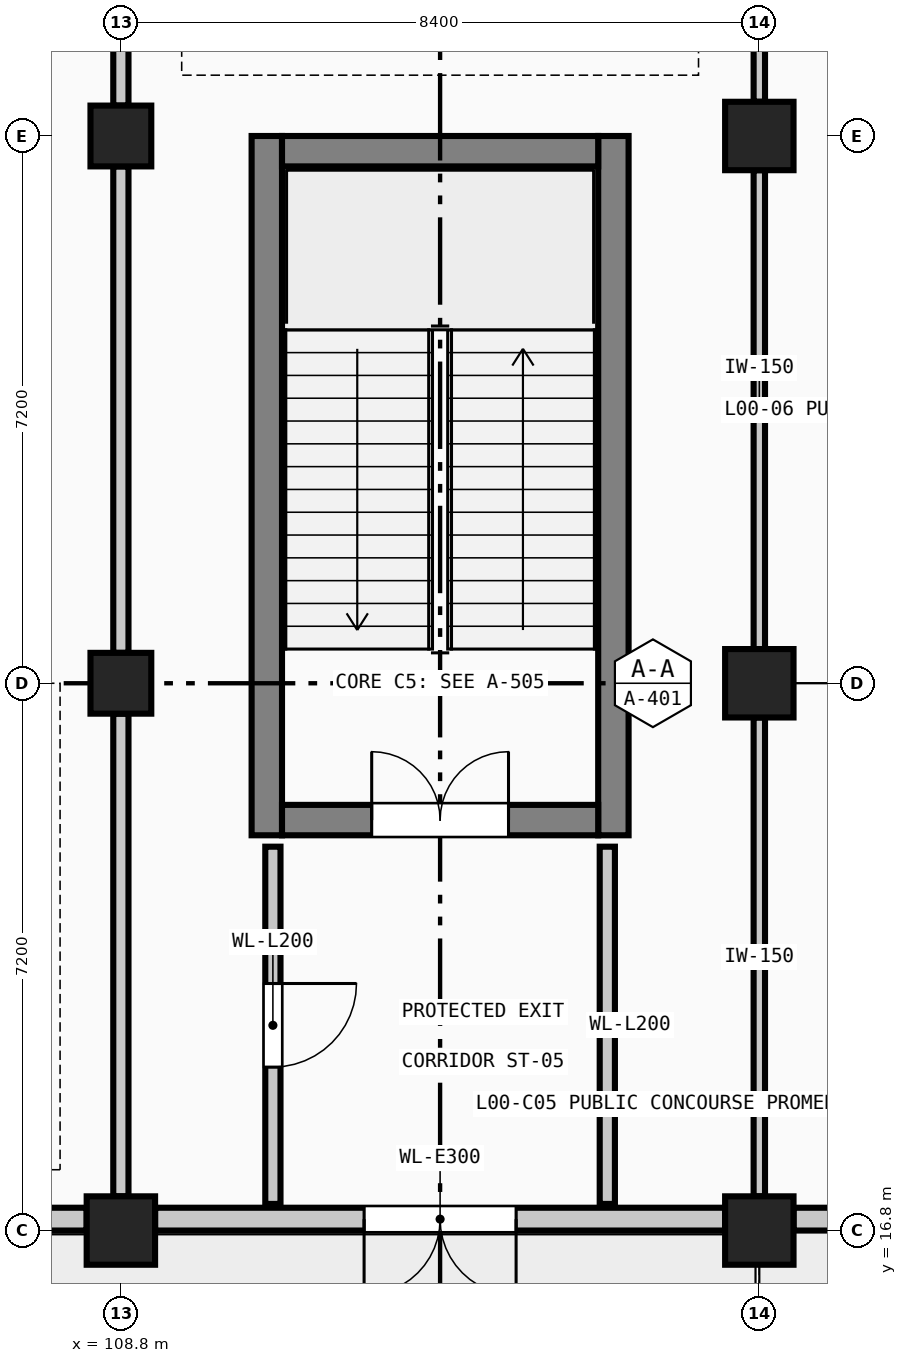
"""IFC4 building model, lengths in metres.
Left out: names, types, materials, properties, quantities, classifications, styles, units other than length and angle.
Written with IfcOpenShell. Run it as: python <this file> out.ifc"""

import sys

from ifc_helpers import new_model, si_unit, direction, frame, frame_2d, origin, origin_2d, place, context, subcontext, project, spatial, rectangle, extrude, element, fill, save


model = new_model("IFC4")
c1 = context("Model", 3, precision=1e-05, world=origin(), true_north=direction((0.0, 1.0)))
c2 = subcontext(c1, "Body", "Model", "MODEL_VIEW")
j1 = project(units=[si_unit("LENGTHUNIT", "METRE"), si_unit("PLANEANGLEUNIT", "RADIAN")], contexts=[c1])
p1 = place(None, origin())
s1 = spatial("IfcSite", under=j1, at=p1, CompositionType="ELEMENT")
p2 = place(p1, origin())
s2 = spatial("IfcBuilding", under=s1, at=p2, CompositionType="ELEMENT")
p3 = place(p2, origin())
s3 = spatial("IfcBuildingStorey", under=s2, at=p3, CompositionType="ELEMENT", Elevation=0.0)
p4 = place(p3, frame((108.8, 16.8, 0.0), z_axis=(0.0, 0.0, 1.0), x_axis=(1.0, 0.0, 0.0)))
e1 = element("IfcColumn", 1, at=p4, inside=s3, PredefinedType="COLUMN", context=c2, shape_type="SweptSolid", body=[
    extrude(rectangle(XDim=0.9, YDim=0.9, at=origin_2d()), origin(), (0.0, 0.0, 1.0), 4.8),
])
for number, where, z_axis, x_axis in (
    (2, (108.8, 24.0, 0.0), (0.0, 0.0, 1.0), (1.0, 0.0, 0.0)),
    (3, (108.8, 31.2, 0.0), (0.0, 0.0, 1.0), (1.0, 0.0, 0.0)),
):
    element("IfcColumn", number, at=place(p3, frame(where, z_axis=z_axis, x_axis=x_axis)), inside=s3, PredefinedType="COLUMN", context=c2, shape_type="SweptSolid", body=[
        extrude(rectangle(XDim=0.8, YDim=0.8, at=origin_2d()), origin(), (0.0, 0.0, 1.0), 4.8),
    ])
for number, where, z_axis, x_axis in (
    (4, (117.2, 16.8, 0.0), (0.0, 0.0, 1.0), (1.0, 0.0, 0.0)),
    (5, (117.2, 24.0, 0.0), (0.0, 0.0, 1.0), (1.0, 0.0, 0.0)),
    (6, (117.2, 31.2, 0.0), (0.0, 0.0, 1.0), (1.0, 0.0, 0.0)),
):
    element("IfcColumn", number, at=place(p3, frame(where, z_axis=z_axis, x_axis=x_axis)), inside=s3, PredefinedType="COLUMN", context=c2, shape_type="SweptSolid", body=[
        extrude(rectangle(XDim=0.9, YDim=0.9, at=origin_2d()), origin(), (0.0, 0.0, 1.0), 4.8),
    ])
for number, where, z_axis, x_axis in (
    (7, (110.72, 22.0, 0.0), (0.0, 0.0, 1.0), (0.0, 1.0, 0.0)),
    (8, (115.28, 31.2, 0.0), (0.0, 0.0, 1.0), (0.0, -1.0, 0.0)),
):
    element("IfcWall", number, at=place(p3, frame(where, z_axis=z_axis, x_axis=x_axis)), inside=s3, PredefinedType="SHEAR", context=c2, shape_type="SweptSolid", body=[
        extrude(rectangle(XDim=9.2, YDim=0.4, at=frame_2d((4.6, 0.0))), origin(), (0.0, 0.0, 1.0), 4.575),
    ])
p5 = place(p3, frame((115.08, 22.2, 0.0), z_axis=(0.0, 0.0, 1.0), x_axis=(-1.0, 0.0, 0.0)))
e9 = element("IfcWall", 9, at=p5, inside=s3, PredefinedType="SHEAR", context=c2, shape_type="SweptSolid", body=[
    extrude(rectangle(XDim=4.16, YDim=0.4, at=frame_2d((2.08, 0.0))), origin(), (0.0, 0.0, 1.0), 4.575),
])
p6 = place(p5, frame((1.18, 0.0, 0.0)))
e10 = element("IfcOpeningElement", 10, at=p6, cuts=e9, PredefinedType="OPENING", context=c2, shape_type="SweptSolid", body=[
    extrude(rectangle(XDim=1.8, YDim=2.2, at=frame_2d((0.9, 1.1))), frame((0.0, 0.21, 0.0), z_axis=(0.0, -1.0, 0.0), x_axis=(1.0, 0.0, 0.0)), (0.0, 0.0, 1.0), 0.42),
])
p7 = place(p3, frame((110.92, 31.0, 0.0), z_axis=(0.0, 0.0, 1.0), x_axis=(1.0, 0.0, 0.0)))
e11 = element("IfcWall", 11, at=p7, inside=s3, PredefinedType="SHEAR", context=c2, shape_type="SweptSolid", body=[
    extrude(rectangle(XDim=4.16, YDim=0.4, at=frame_2d((2.08, 0.0))), origin(), (0.0, 0.0, 1.0), 4.575),
])
p8 = place(p3, frame((110.8, 17.15, 0.0), z_axis=(0.0, 0.0, 1.0), x_axis=(0.0, 1.0, 0.0)))
e12 = element("IfcWall", 12, at=p8, inside=s3, PredefinedType="SOLIDWALL", context=c2, shape_type="SweptSolid", body=[
    extrude(rectangle(XDim=4.7, YDim=0.2, at=frame_2d((2.35, 0.0))), origin(), (0.0, 0.0, 1.0), 4.525),
])
p9 = place(p8, frame((1.8, 0.0, 0.0)))
e13 = element("IfcOpeningElement", 13, at=p9, cuts=e12, PredefinedType="OPENING", context=c2, shape_type="SweptSolid", body=[
    extrude(rectangle(XDim=1.1, YDim=2.2, at=frame_2d((0.55, 1.1))), frame((0.0, 0.11, 0.0), z_axis=(0.0, -1.0, 0.0), x_axis=(1.0, 0.0, 0.0)), (0.0, 0.0, 1.0), 0.22),
])
p10 = place(p3, frame((115.2, 17.15, 0.0), z_axis=(0.0, 0.0, 1.0), x_axis=(0.0, 1.0, 0.0)))
e14 = element("IfcWall", 14, at=p10, inside=s3, PredefinedType="SOLIDWALL", context=c2, shape_type="SweptSolid", body=[
    extrude(rectangle(XDim=4.7, YDim=0.2, at=frame_2d((2.35, 0.0))), origin(), (0.0, 0.0, 1.0), 4.525),
])
p11 = place(p3, frame((125.2, 16.95, 0.0), z_axis=(0.0, 0.0, 1.0), x_axis=(-1.0, 0.0, 0.0)))
e15 = element("IfcWall", 15, at=p11, inside=s3, PredefinedType="SOLIDWALL", context=c2, shape_type="SweptSolid", body=[
    extrude(rectangle(XDim=7.55, YDim=0.3, at=frame_2d((3.775, 0.0))), origin(), (0.0, 0.0, 1.0), 4.1),
])
p12 = place(p11, frame((2.275, 0.0, 0.75)))
e16 = element("IfcOpeningElement", 16, at=p12, cuts=e15, PredefinedType="OPENING", context=c2, shape_type="SweptSolid", body=[
    extrude(rectangle(XDim=3.0, YDim=2.4, at=frame_2d((1.5, 1.2))), frame((0.0, 0.16, 0.0), z_axis=(0.0, -1.0, 0.0), x_axis=(1.0, 0.0, 0.0)), (0.0, 0.0, 1.0), 0.32),
])
p13 = place(p3, frame((116.75, 16.95, 0.0), z_axis=(0.0, 0.0, 1.0), x_axis=(-1.0, 0.0, 0.0)))
e17 = element("IfcWall", 17, at=p13, inside=s3, PredefinedType="SOLIDWALL", context=c2, shape_type="SweptSolid", body=[
    extrude(rectangle(XDim=7.5, YDim=0.3, at=frame_2d((3.75, 0.0))), origin(), (0.0, 0.0, 1.0), 4.0),
])
p14 = place(p13, frame((2.75, 0.0, 0.0)))
e18 = element("IfcOpeningElement", 18, at=p14, cuts=e17, PredefinedType="OPENING", context=c2, shape_type="SweptSolid", body=[
    extrude(rectangle(XDim=2.0, YDim=2.4, at=frame_2d((1.0, 1.2))), frame((0.0, 0.16, 0.0), z_axis=(0.0, -1.0, 0.0), x_axis=(1.0, 0.0, 0.0)), (0.0, 0.0, 1.0), 0.32),
])
p15 = place(p3, frame((108.35, 16.95, 0.0), z_axis=(0.0, 0.0, 1.0), x_axis=(-1.0, 0.0, 0.0)))
e19 = element("IfcWall", 19, at=p15, inside=s3, PredefinedType="SOLIDWALL", context=c2, shape_type="SweptSolid", body=[
    extrude(rectangle(XDim=7.5, YDim=0.3, at=frame_2d((3.75, 0.0))), origin(), (0.0, 0.0, 1.0), 4.0),
])
p16 = place(p15, frame((2.25, 0.0, 0.75)))
e20 = element("IfcOpeningElement", 20, at=p16, cuts=e19, PredefinedType="OPENING", context=c2, shape_type="SweptSolid", body=[
    extrude(rectangle(XDim=3.0, YDim=2.4, at=frame_2d((1.5, 1.2))), frame((0.0, 0.16, 0.0), z_axis=(0.0, -1.0, 0.0), x_axis=(1.0, 0.0, 0.0)), (0.0, 0.0, 1.0), 0.32),
])
p17 = place(p3, frame((108.8, 38.0, 0.0), z_axis=(0.0, 0.0, 1.0), x_axis=(0.0, -1.0, 0.0)))
e21 = element("IfcWall", 21, at=p17, inside=s3, PredefinedType="PARTITIONING", context=c2, shape_type="SweptSolid", body=[
    extrude(rectangle(XDim=6.4, YDim=0.2, at=frame_2d((3.2, 0.0))), origin(), (0.0, 0.0, 1.0), 4.05),
])
p18 = place(p3, frame((108.8, 30.8, 0.0), z_axis=(0.0, 0.0, 1.0), x_axis=(0.0, -1.0, 0.0)))
e22 = element("IfcWall", 22, at=p18, inside=s3, PredefinedType="PARTITIONING", context=c2, shape_type="SweptSolid", body=[
    extrude(rectangle(XDim=6.4, YDim=0.2, at=frame_2d((3.2, 0.0))), origin(), (0.0, 0.0, 1.0), 4.05),
])
p19 = place(p3, frame((108.8, 23.6, 0.0), z_axis=(0.0, 0.0, 1.0), x_axis=(0.0, -1.0, 0.0)))
e23 = element("IfcWall", 23, at=p19, inside=s3, PredefinedType="PARTITIONING", context=c2, shape_type="SweptSolid", body=[
    extrude(rectangle(XDim=6.35, YDim=0.2, at=frame_2d((3.175, 0.0))), origin(), (0.0, 0.0, 1.0), 4.05),
])
for number, where, z_axis, x_axis in (
    (24, (117.2, 17.25, 0.0), (0.0, 0.0, 1.0), (0.0, 1.0, 0.0)),
    (25, (117.2, 24.45, 0.0), (0.0, 0.0, 1.0), (0.0, 1.0, 0.0)),
    (26, (117.2, 31.65, 0.0), (0.0, 0.0, 1.0), (0.0, 1.0, 0.0)),
):
    element("IfcWall", number, at=place(p3, frame(where, z_axis=z_axis, x_axis=x_axis)), inside=s3, PredefinedType="PARTITIONING", context=c2, shape_type="SweptSolid", body=[
        extrude(rectangle(XDim=6.3, YDim=0.15, at=frame_2d((3.15, 0.0))), origin(), (0.0, 0.0, 1.0), 4.05),
    ])
p20 = place(p6, frame((1.8, 0.0, 0.0), z_axis=(0.0, 0.0, 1.0), x_axis=(-1.0, 0.0, 0.0)))
e27 = element("IfcDoor", 27, at=p20, inside=s3, OperationType="DOUBLE_DOOR_SINGLE_SWING", PredefinedType="DOOR", context=c2, shape_type="SweptSolid", body=[
    extrude(rectangle(XDim=1.8, YDim=2.2, at=frame_2d((0.9, 1.1))), frame((0.0, 0.025, 0.0), z_axis=(0.0, -1.0, 0.0), x_axis=(1.0, 0.0, 0.0)), (0.0, 0.0, 1.0), 0.05),
])
fill(e10, e27)
p21 = place(p9, frame((1.1, 0.0, 0.0), z_axis=(0.0, 0.0, 1.0), x_axis=(-1.0, 0.0, 0.0)))
e28 = element("IfcDoor", 28, at=p21, inside=s3, OperationType="SINGLE_SWING_LEFT", PredefinedType="DOOR", context=c2, shape_type="SweptSolid", body=[
    extrude(rectangle(XDim=1.1, YDim=2.2, at=frame_2d((0.55, 1.1))), frame((0.0, 0.025, 0.0), z_axis=(0.0, -1.0, 0.0), x_axis=(1.0, 0.0, 0.0)), (0.0, 0.0, 1.0), 0.05),
])
fill(e13, e28)
p22 = place(p14, origin())
e29 = element("IfcDoor", 29, at=p22, inside=s3, OperationType="DOUBLE_DOOR_SINGLE_SWING", PredefinedType="DOOR", context=c2, shape_type="SweptSolid", body=[
    extrude(rectangle(XDim=2.0, YDim=2.4, at=frame_2d((1.0, 1.2))), frame((0.0, 0.025, 0.0), z_axis=(0.0, -1.0, 0.0), x_axis=(1.0, 0.0, 0.0)), (0.0, 0.0, 1.0), 0.05),
])
fill(e18, e29)
save(model, sys.argv[1])
